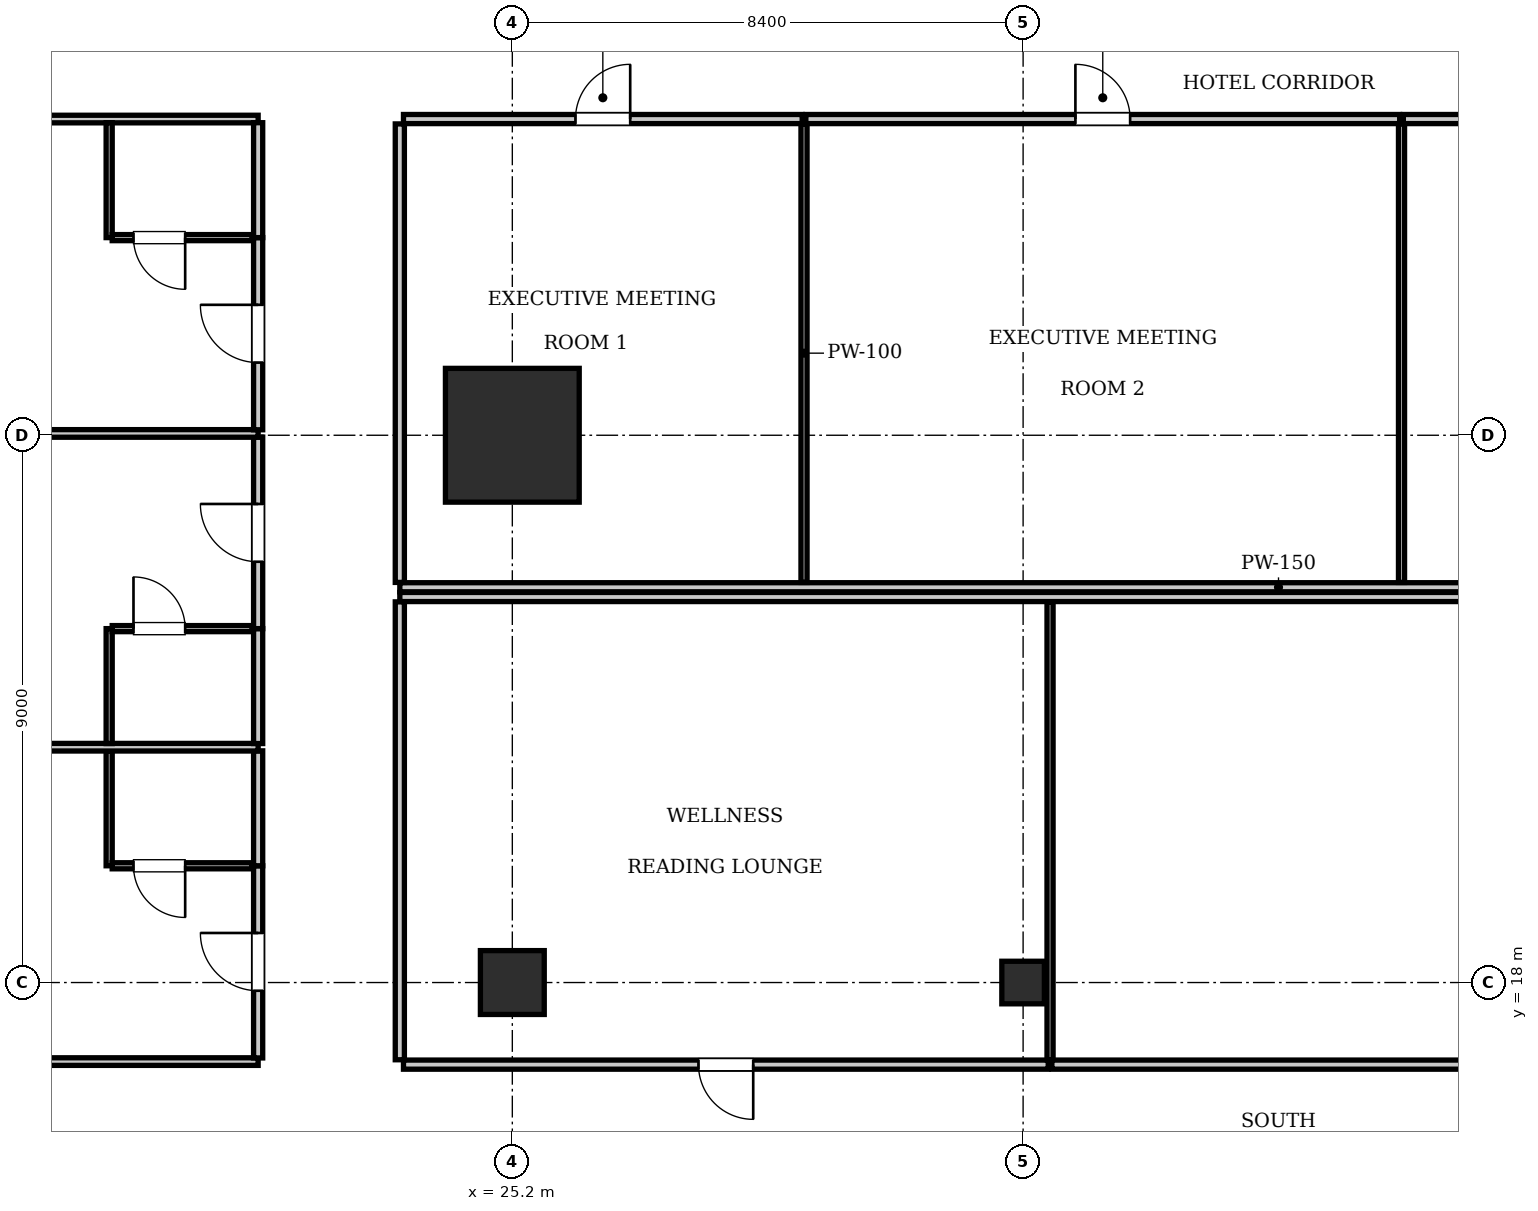
"""IFC4 building model, lengths in metres.
Left out: names, types, materials, properties, quantities, classifications, styles, units other than length and angle.
Written with IfcOpenShell. Run it as: python <this file> out.ifc"""

import sys

from ifc_helpers import new_model, si_unit, direction, frame, frame_2d, origin, origin_2d, place, context, subcontext, project, spatial, rectangle, i_section, extrude, element, fill, save


model = new_model("IFC4")
c1 = context("Model", 3, precision=1e-05, world=origin(), true_north=direction((0.0, 1.0)))
c2 = subcontext(c1, "Body", "Model", "MODEL_VIEW")
j1 = project(units=[si_unit("LENGTHUNIT", "METRE"), si_unit("PLANEANGLEUNIT", "RADIAN")], contexts=[c1])
p1 = place(None, origin())
s1 = spatial("IfcSite", under=j1, at=p1, CompositionType="ELEMENT")
p2 = place(p1, origin())
s2 = spatial("IfcBuilding", under=s1, at=p2, CompositionType="ELEMENT")
p3 = place(p2, frame((0.0, 0.0, 50.05)))
s3 = spatial("IfcBuildingStorey", under=s2, at=p3, CompositionType="ELEMENT", Elevation=50.05)
p4 = place(p3, frame((25.2, 27.0, 0.0), z_axis=(0.0, 0.0, 1.0), x_axis=(1.0, 0.0, 0.0)))
e1 = element("IfcColumn", 1, at=p4, inside=s3, PredefinedType="COLUMN", context=c2, shape_type="SweptSolid", body=[
    extrude(rectangle(XDim=2.2, YDim=2.2, at=origin_2d()), origin(), (0.0, 0.0, 1.0), 3.85),
])
p5 = place(p3, frame((25.2, 18.0, 0.0), z_axis=(0.0, 0.0, 1.0), x_axis=(1.0, 0.0, 0.0)))
e2 = element("IfcColumn", 2, at=p5, inside=s3, PredefinedType="COLUMN", context=c2, shape_type="SweptSolid", body=[
    extrude(rectangle(XDim=1.05, YDim=1.05, at=origin_2d()), origin(), (0.0, 0.0, 1.0), 3.85),
])
p6 = place(p3, frame((33.6, 18.0, 0.0), z_axis=(0.0, 0.0, 1.0), x_axis=(1.0, 0.0, 0.0)))
e3 = element("IfcColumn", 3, at=p6, inside=s3, PredefinedType="COLUMN", context=c2, shape_type="SweptSolid", body=[
    extrude(i_section(OverallWidth=0.7, OverallDepth=0.7, WebThickness=0.028, FlangeThickness=0.044, at=origin_2d()), origin(), (0.0, 0.0, 1.0), 3.85),
])
p7 = place(p3, frame((23.35, 24.5, 0.0), z_axis=(0.0, 0.0, 1.0), x_axis=(1.0, 0.0, 0.0)))
e4 = element("IfcWall", 4, at=p7, inside=s3, PredefinedType="PARTITIONING", context=c2, shape_type="SweptSolid", body=[
    extrude(rectangle(XDim=28.9, YDim=0.15, at=frame_2d((14.45, 0.0))), origin(), (0.0, 0.0, 1.0), 3.61),
])
p8 = place(p3, frame((23.35, 24.58, 0.0), z_axis=(0.0, 0.0, 1.0), x_axis=(0.0, 1.0, 0.0)))
e5 = element("IfcWall", 5, at=p8, inside=s3, PredefinedType="PARTITIONING", context=c2, shape_type="SweptSolid", body=[
    extrude(rectangle(XDim=7.54, YDim=0.15, at=frame_2d((3.77, 0.0))), origin(), (0.0, 0.0, 1.0), 3.61),
])
p9 = place(p3, frame((23.41, 32.2, 0.0), z_axis=(0.0, 0.0, 1.0), x_axis=(1.0, 0.0, 0.0)))
e6 = element("IfcWall", 6, at=p9, inside=s3, PredefinedType="PARTITIONING", context=c2, shape_type="SweptSolid", body=[
    extrude(rectangle(XDim=6.557, YDim=0.15, at=frame_2d((3.279, 0.0))), origin(), (0.0, 0.0, 1.0), 3.61),
])
p10 = place(p9, frame((2.829, 0.0, 0.0)))
e7 = element("IfcOpeningElement", 7, at=p10, cuts=e6, PredefinedType="OPENING", context=c2, shape_type="SweptSolid", body=[
    extrude(rectangle(XDim=0.9, YDim=2.1, at=frame_2d((0.45, 1.05))), frame((0.0, 0.085, 0.0), z_axis=(0.0, -1.0, 0.0), x_axis=(1.0, 0.0, 0.0)), (0.0, 0.0, 1.0), 0.17),
])
p11 = place(p3, frame((29.997, 24.58, 0.0), z_axis=(0.0, 0.0, 1.0), x_axis=(0.0, 1.0, 0.0)))
e8 = element("IfcWall", 8, at=p11, inside=s3, PredefinedType="PARTITIONING", context=c2, shape_type="SweptSolid", body=[
    extrude(rectangle(XDim=7.54, YDim=0.1, at=frame_2d((3.77, 0.0))), origin(), (0.0, 0.0, 1.0), 3.61),
])
p12 = place(p3, frame((30.027, 32.2, 0.0), z_axis=(0.0, 0.0, 1.0), x_axis=(1.0, 0.0, 0.0)))
e9 = element("IfcWall", 9, at=p12, inside=s3, PredefinedType="PARTITIONING", context=c2, shape_type="SweptSolid", body=[
    extrude(rectangle(XDim=9.766, YDim=0.15, at=frame_2d((4.883, 0.0))), origin(), (0.0, 0.0, 1.0), 3.61),
])
p13 = place(p12, frame((4.433, 0.0, 0.0)))
e10 = element("IfcOpeningElement", 10, at=p13, cuts=e9, PredefinedType="OPENING", context=c2, shape_type="SweptSolid", body=[
    extrude(rectangle(XDim=0.9, YDim=2.1, at=frame_2d((0.45, 1.05))), frame((0.0, 0.085, 0.0), z_axis=(0.0, -1.0, 0.0), x_axis=(1.0, 0.0, 0.0)), (0.0, 0.0, 1.0), 0.17),
])
p14 = place(p3, frame((39.823, 24.58, 0.0), z_axis=(0.0, 0.0, 1.0), x_axis=(0.0, 1.0, 0.0)))
e11 = element("IfcWall", 11, at=p14, inside=s3, PredefinedType="PARTITIONING", context=c2, shape_type="SweptSolid", body=[
    extrude(rectangle(XDim=7.54, YDim=0.1, at=frame_2d((3.77, 0.0))), origin(), (0.0, 0.0, 1.0), 3.61),
])
p15 = place(p3, frame((39.853, 32.2, 0.0), z_axis=(0.0, 0.0, 1.0), x_axis=(1.0, 0.0, 0.0)))
e12 = element("IfcWall", 12, at=p15, inside=s3, PredefinedType="PARTITIONING", context=c2, shape_type="SweptSolid", body=[
    extrude(rectangle(XDim=12.337, YDim=0.15, at=frame_2d((6.168, 0.0))), origin(), (0.0, 0.0, 1.0), 3.61),
])
p16 = place(p15, frame((5.719, 0.0, 0.0)))
e13 = element("IfcOpeningElement", 13, at=p16, cuts=e12, PredefinedType="OPENING", context=c2, shape_type="SweptSolid", body=[
    extrude(rectangle(XDim=0.9, YDim=2.1, at=frame_2d((0.45, 1.05))), frame((0.0, 0.085, 0.0), z_axis=(0.0, -1.0, 0.0), x_axis=(1.0, 0.0, 0.0)), (0.0, 0.0, 1.0), 0.17),
])
p17 = place(p3, frame((23.35, 24.34, 0.0), z_axis=(0.0, 0.0, 1.0), x_axis=(1.0, 0.0, 0.0)))
e14 = element("IfcWall", 14, at=p17, inside=s3, PredefinedType="PARTITIONING", context=c2, shape_type="SweptSolid", body=[
    extrude(rectangle(XDim=28.9, YDim=0.15, at=frame_2d((14.45, 0.0))), origin(), (0.0, 0.0, 1.0), 3.61),
])
p18 = place(p3, frame((23.35, 16.73, 0.0), z_axis=(0.0, 0.0, 1.0), x_axis=(0.0, 1.0, 0.0)))
e15 = element("IfcWall", 15, at=p18, inside=s3, PredefinedType="PARTITIONING", context=c2, shape_type="SweptSolid", body=[
    extrude(rectangle(XDim=7.53, YDim=0.15, at=frame_2d((3.765, 0.0))), origin(), (0.0, 0.0, 1.0), 3.61),
])
p19 = place(p3, frame((23.41, 16.65, 0.0), z_axis=(0.0, 0.0, 1.0), x_axis=(1.0, 0.0, 0.0)))
e16 = element("IfcWall", 16, at=p19, inside=s3, PredefinedType="PARTITIONING", context=c2, shape_type="SweptSolid", body=[
    extrude(rectangle(XDim=10.603, YDim=0.15, at=frame_2d((5.302, 0.0))), origin(), (0.0, 0.0, 1.0), 3.61),
])
p20 = place(p19, frame((4.852, 0.0, 0.0)))
e17 = element("IfcOpeningElement", 17, at=p20, cuts=e16, PredefinedType="OPENING", context=c2, shape_type="SweptSolid", body=[
    extrude(rectangle(XDim=0.9, YDim=2.1, at=frame_2d((0.45, 1.05))), frame((0.0, 0.085, 0.0), z_axis=(0.0, -1.0, 0.0), x_axis=(1.0, 0.0, 0.0)), (0.0, 0.0, 1.0), 0.17),
])
p21 = place(p3, frame((34.043, 16.73, 0.0), z_axis=(0.0, 0.0, 1.0), x_axis=(0.0, 1.0, 0.0)))
e18 = element("IfcWall", 18, at=p21, inside=s3, PredefinedType="PARTITIONING", context=c2, shape_type="SweptSolid", body=[
    extrude(rectangle(XDim=7.53, YDim=0.1, at=frame_2d((3.765, 0.0))), origin(), (0.0, 0.0, 1.0), 3.61),
])
p22 = place(p3, frame((34.073, 16.65, 0.0), z_axis=(0.0, 0.0, 1.0), x_axis=(1.0, 0.0, 0.0)))
e19 = element("IfcWall", 19, at=p22, inside=s3, PredefinedType="PARTITIONING", context=c2, shape_type="SweptSolid", body=[
    extrude(rectangle(XDim=18.117, YDim=0.15, at=frame_2d((9.059, 0.0))), origin(), (0.0, 0.0, 1.0), 3.61),
])
p23 = place(p22, frame((8.729, 0.0, 0.0)))
e20 = element("IfcOpeningElement", 20, at=p23, cuts=e19, PredefinedType="OPENING", context=c2, shape_type="SweptSolid", body=[
    extrude(rectangle(XDim=0.9, YDim=2.1, at=frame_2d((0.45, 1.05))), frame((0.0, 0.085, 0.0), z_axis=(0.0, -1.0, 0.0), x_axis=(1.0, 0.0, 0.0)), (0.0, 0.0, 1.0), 0.17),
])
for number, where, z_axis, x_axis in (
    (21, (10.9, 16.7, 0.0), (0.0, 0.0, 1.0), (1.0, 0.0, 0.0)),
    (22, (10.9, 32.2, 0.0), (0.0, 0.0, 1.0), (1.0, 0.0, 0.0)),
):
    element("IfcWall", number, at=place(p3, frame(where, z_axis=z_axis, x_axis=x_axis)), inside=s3, PredefinedType="PARTITIONING", context=c2, shape_type="SweptSolid", body=[
        extrude(rectangle(XDim=10.12, YDim=0.125, at=frame_2d((5.06, 0.0))), origin(), (0.0, 0.0, 1.0), 3.61),
    ])
p24 = place(p3, frame((21.02, 16.76, 0.0), z_axis=(0.0, 0.0, 1.0), x_axis=(0.0, 1.0, 0.0)))
e23 = element("IfcWall", 23, at=p24, inside=s3, PredefinedType="PARTITIONING", context=c2, shape_type="SweptSolid", body=[
    extrude(rectangle(XDim=3.16, YDim=0.15, at=frame_2d((1.58, 0.0))), origin(), (0.0, 0.0, 1.0), 3.403),
])
p25 = place(p24, frame((1.105, 0.0, 0.0)))
e24 = element("IfcOpeningElement", 24, at=p25, cuts=e23, PredefinedType="OPENING", context=c2, shape_type="SweptSolid", body=[
    extrude(rectangle(XDim=0.95, YDim=2.15, at=frame_2d((0.475, 1.075))), frame((0.0, 0.085, 0.0), z_axis=(0.0, -1.0, 0.0), x_axis=(1.0, 0.0, 0.0)), (0.0, 0.0, 1.0), 0.17),
])
p26 = place(p3, frame((21.02, 19.92, 0.0), z_axis=(0.0, 0.0, 1.0), x_axis=(0.0, 1.0, 0.0)))
e25 = element("IfcWall", 25, at=p26, inside=s3, PredefinedType="PARTITIONING", context=c2, shape_type="SweptSolid", body=[
    extrude(rectangle(XDim=1.89, YDim=0.15, at=frame_2d((0.945, 0.0))), origin(), (0.0, 0.0, 1.0), 3.457),
])
p27 = place(p3, frame((18.57, 19.92, 0.0), z_axis=(0.0, 0.0, 1.0), x_axis=(0.0, 1.0, 0.0)))
e26 = element("IfcWall", 26, at=p27, inside=s3, PredefinedType="PARTITIONING", context=c2, shape_type="SweptSolid", body=[
    extrude(rectangle(XDim=1.89, YDim=0.1, at=frame_2d((0.945, 0.0))), origin(), (0.0, 0.0, 1.0), 3.61),
])
p28 = place(p3, frame((18.62, 19.92, 0.0), z_axis=(0.0, 0.0, 1.0), x_axis=(1.0, 0.0, 0.0)))
e27 = element("IfcWall", 27, at=p28, inside=s3, PredefinedType="PARTITIONING", context=c2, shape_type="SweptSolid", body=[
    extrude(rectangle(XDim=2.3, YDim=0.1, at=frame_2d((1.15, 0.0))), origin(), (0.0, 0.0, 1.0), 3.61),
])
p29 = place(p28, frame((0.35, 0.0, 0.0)))
e28 = element("IfcOpeningElement", 28, at=p29, cuts=e27, PredefinedType="OPENING", context=c2, shape_type="SweptSolid", body=[
    extrude(rectangle(XDim=0.85, YDim=2.1, at=frame_2d((0.425, 1.05))), frame((0.0, 0.06, 0.0), z_axis=(0.0, -1.0, 0.0), x_axis=(1.0, 0.0, 0.0)), (0.0, 0.0, 1.0), 0.12),
])
p30 = place(p3, frame((10.9, 21.87, 0.0), z_axis=(0.0, 0.0, 1.0), x_axis=(1.0, 0.0, 0.0)))
e29 = element("IfcWall", 29, at=p30, inside=s3, PredefinedType="PARTITIONING", context=c2, shape_type="SweptSolid", body=[
    extrude(rectangle(XDim=10.12, YDim=0.125, at=frame_2d((5.06, 0.0))), origin(), (0.0, 0.0, 1.0), 3.61),
])
p31 = place(p3, frame((21.02, 21.93, 0.0), z_axis=(0.0, 0.0, 1.0), x_axis=(0.0, 1.0, 0.0)))
e30 = element("IfcWall", 30, at=p31, inside=s3, PredefinedType="PARTITIONING", context=c2, shape_type="SweptSolid", body=[
    extrude(rectangle(XDim=1.89, YDim=0.15, at=frame_2d((0.945, 0.0))), origin(), (0.0, 0.0, 1.0), 3.457),
])
p32 = place(p3, frame((21.02, 23.82, 0.0), z_axis=(0.0, 0.0, 1.0), x_axis=(0.0, 1.0, 0.0)))
e31 = element("IfcWall", 31, at=p32, inside=s3, PredefinedType="PARTITIONING", context=c2, shape_type="SweptSolid", body=[
    extrude(rectangle(XDim=3.15, YDim=0.15, at=frame_2d((1.575, 0.0))), origin(), (0.0, 0.0, 1.0), 3.457),
])
p33 = place(p32, frame((1.1, 0.0, 0.0)))
e32 = element("IfcOpeningElement", 32, at=p33, cuts=e31, PredefinedType="OPENING", context=c2, shape_type="SweptSolid", body=[
    extrude(rectangle(XDim=0.95, YDim=2.15, at=frame_2d((0.475, 1.075))), frame((0.0, 0.085, 0.0), z_axis=(0.0, -1.0, 0.0), x_axis=(1.0, 0.0, 0.0)), (0.0, 0.0, 1.0), 0.17),
])
p34 = place(p3, frame((18.57, 21.93, 0.0), z_axis=(0.0, 0.0, 1.0), x_axis=(0.0, 1.0, 0.0)))
e33 = element("IfcWall", 33, at=p34, inside=s3, PredefinedType="PARTITIONING", context=c2, shape_type="SweptSolid", body=[
    extrude(rectangle(XDim=1.89, YDim=0.1, at=frame_2d((0.945, 0.0))), origin(), (0.0, 0.0, 1.0), 3.61),
])
p35 = place(p3, frame((18.62, 23.82, 0.0), z_axis=(0.0, 0.0, 1.0), x_axis=(1.0, 0.0, 0.0)))
e34 = element("IfcWall", 34, at=p35, inside=s3, PredefinedType="PARTITIONING", context=c2, shape_type="SweptSolid", body=[
    extrude(rectangle(XDim=2.3, YDim=0.1, at=frame_2d((1.15, 0.0))), origin(), (0.0, 0.0, 1.0), 3.61),
])
p36 = place(p35, frame((0.35, 0.0, 0.0)))
e35 = element("IfcOpeningElement", 35, at=p36, cuts=e34, PredefinedType="OPENING", context=c2, shape_type="SweptSolid", body=[
    extrude(rectangle(XDim=0.85, YDim=2.1, at=frame_2d((0.425, 1.05))), frame((0.0, 0.06, 0.0), z_axis=(0.0, -1.0, 0.0), x_axis=(1.0, 0.0, 0.0)), (0.0, 0.0, 1.0), 0.12),
])
p37 = place(p3, frame((10.9, 27.03, 0.0), z_axis=(0.0, 0.0, 1.0), x_axis=(1.0, 0.0, 0.0)))
e36 = element("IfcWall", 36, at=p37, inside=s3, PredefinedType="PARTITIONING", context=c2, shape_type="SweptSolid", body=[
    extrude(rectangle(XDim=10.12, YDim=0.125, at=frame_2d((5.06, 0.0))), origin(), (0.0, 0.0, 1.0), 2.988),
])
p38 = place(p3, frame((21.02, 27.09, 0.0), z_axis=(0.0, 0.0, 1.0), x_axis=(0.0, 1.0, 0.0)))
e37 = element("IfcWall", 37, at=p38, inside=s3, PredefinedType="PARTITIONING", context=c2, shape_type="SweptSolid", body=[
    extrude(rectangle(XDim=3.16, YDim=0.15, at=frame_2d((1.58, 0.0))), origin(), (0.0, 0.0, 1.0), 3.207),
])
p39 = place(p38, frame((1.105, 0.0, 0.0)))
e38 = element("IfcOpeningElement", 38, at=p39, cuts=e37, PredefinedType="OPENING", context=c2, shape_type="SweptSolid", body=[
    extrude(rectangle(XDim=0.95, YDim=2.15, at=frame_2d((0.475, 1.075))), frame((0.0, 0.085, 0.0), z_axis=(0.0, -1.0, 0.0), x_axis=(1.0, 0.0, 0.0)), (0.0, 0.0, 1.0), 0.17),
])
p40 = place(p3, frame((21.02, 30.25, 0.0), z_axis=(0.0, 0.0, 1.0), x_axis=(0.0, 1.0, 0.0)))
e39 = element("IfcWall", 39, at=p40, inside=s3, PredefinedType="PARTITIONING", context=c2, shape_type="SweptSolid", body=[
    extrude(rectangle(XDim=1.89, YDim=0.15, at=frame_2d((0.945, 0.0))), origin(), (0.0, 0.0, 1.0), 3.207),
])
p41 = place(p3, frame((18.57, 30.25, 0.0), z_axis=(0.0, 0.0, 1.0), x_axis=(0.0, 1.0, 0.0)))
e40 = element("IfcWall", 40, at=p41, inside=s3, PredefinedType="PARTITIONING", context=c2, shape_type="SweptSolid", body=[
    extrude(rectangle(XDim=1.89, YDim=0.1, at=frame_2d((0.945, 0.0))), origin(), (0.0, 0.0, 1.0), 3.61),
])
p42 = place(p3, frame((18.62, 30.25, 0.0), z_axis=(0.0, 0.0, 1.0), x_axis=(1.0, 0.0, 0.0)))
e41 = element("IfcWall", 41, at=p42, inside=s3, PredefinedType="PARTITIONING", context=c2, shape_type="SweptSolid", body=[
    extrude(rectangle(XDim=2.3, YDim=0.1, at=frame_2d((1.15, 0.0))), origin(), (0.0, 0.0, 1.0), 3.61),
])
p43 = place(p42, frame((0.35, 0.0, 0.0)))
e42 = element("IfcOpeningElement", 42, at=p43, cuts=e41, PredefinedType="OPENING", context=c2, shape_type="SweptSolid", body=[
    extrude(rectangle(XDim=0.85, YDim=2.1, at=frame_2d((0.425, 1.05))), frame((0.0, 0.06, 0.0), z_axis=(0.0, -1.0, 0.0), x_axis=(1.0, 0.0, 0.0)), (0.0, 0.0, 1.0), 0.12),
])
p44 = place(p10, origin())
e43 = element("IfcDoor", 43, at=p44, inside=s3, OperationType="SINGLE_SWING_RIGHT", PredefinedType="DOOR", context=c2, shape_type="SweptSolid", body=[
    extrude(rectangle(XDim=0.9, YDim=2.1, at=frame_2d((0.45, 1.05))), frame((0.0, 0.025, 0.0), z_axis=(0.0, -1.0, 0.0), x_axis=(1.0, 0.0, 0.0)), (0.0, 0.0, 1.0), 0.05),
])
fill(e7, e43)
p45 = place(p13, origin())
e44 = element("IfcDoor", 44, at=p45, inside=s3, OperationType="SINGLE_SWING_LEFT", PredefinedType="DOOR", context=c2, shape_type="SweptSolid", body=[
    extrude(rectangle(XDim=0.9, YDim=2.1, at=frame_2d((0.45, 1.05))), frame((0.0, 0.025, 0.0), z_axis=(0.0, -1.0, 0.0), x_axis=(1.0, 0.0, 0.0)), (0.0, 0.0, 1.0), 0.05),
])
fill(e10, e44)
p46 = place(p20, frame((0.9, 0.0, 0.0), z_axis=(0.0, 0.0, 1.0), x_axis=(-1.0, 0.0, 0.0)))
e45 = element("IfcDoor", 45, at=p46, inside=s3, OperationType="SINGLE_SWING_LEFT", PredefinedType="DOOR", context=c2, shape_type="SweptSolid", body=[
    extrude(rectangle(XDim=0.9, YDim=2.1, at=frame_2d((0.45, 1.05))), frame((0.0, 0.025, 0.0), z_axis=(0.0, -1.0, 0.0), x_axis=(1.0, 0.0, 0.0)), (0.0, 0.0, 1.0), 0.05),
])
fill(e17, e45)
p47 = place(p29, frame((0.85, 0.0, 0.0), z_axis=(0.0, 0.0, 1.0), x_axis=(-1.0, 0.0, 0.0)))
e46 = element("IfcDoor", 46, at=p47, inside=s3, OperationType="SINGLE_SWING_LEFT", PredefinedType="DOOR", context=c2, shape_type="SweptSolid", body=[
    extrude(rectangle(XDim=0.85, YDim=2.1, at=frame_2d((0.425, 1.05))), frame((0.0, 0.025, 0.0), z_axis=(0.0, -1.0, 0.0), x_axis=(1.0, 0.0, 0.0)), (0.0, 0.0, 1.0), 0.05),
])
fill(e28, e46)
p48 = place(p25, origin())
e47 = element("IfcDoor", 47, at=p48, inside=s3, OperationType="SINGLE_SWING_RIGHT", PredefinedType="DOOR", context=c2, shape_type="SweptSolid", body=[
    extrude(rectangle(XDim=0.95, YDim=2.15, at=frame_2d((0.475, 1.075))), frame((0.0, 0.025, 0.0), z_axis=(0.0, -1.0, 0.0), x_axis=(1.0, 0.0, 0.0)), (0.0, 0.0, 1.0), 0.05),
])
fill(e24, e47)
p49 = place(p36, origin())
e48 = element("IfcDoor", 48, at=p49, inside=s3, OperationType="SINGLE_SWING_LEFT", PredefinedType="DOOR", context=c2, shape_type="SweptSolid", body=[
    extrude(rectangle(XDim=0.85, YDim=2.1, at=frame_2d((0.425, 1.05))), frame((0.0, 0.025, 0.0), z_axis=(0.0, -1.0, 0.0), x_axis=(1.0, 0.0, 0.0)), (0.0, 0.0, 1.0), 0.05),
])
fill(e35, e48)
p50 = place(p33, origin())
e49 = element("IfcDoor", 49, at=p50, inside=s3, OperationType="SINGLE_SWING_RIGHT", PredefinedType="DOOR", context=c2, shape_type="SweptSolid", body=[
    extrude(rectangle(XDim=0.95, YDim=2.15, at=frame_2d((0.475, 1.075))), frame((0.0, 0.025, 0.0), z_axis=(0.0, -1.0, 0.0), x_axis=(1.0, 0.0, 0.0)), (0.0, 0.0, 1.0), 0.05),
])
fill(e32, e49)
p51 = place(p43, frame((0.85, 0.0, 0.0), z_axis=(0.0, 0.0, 1.0), x_axis=(-1.0, 0.0, 0.0)))
e50 = element("IfcDoor", 50, at=p51, inside=s3, OperationType="SINGLE_SWING_LEFT", PredefinedType="DOOR", context=c2, shape_type="SweptSolid", body=[
    extrude(rectangle(XDim=0.85, YDim=2.1, at=frame_2d((0.425, 1.05))), frame((0.0, 0.025, 0.0), z_axis=(0.0, -1.0, 0.0), x_axis=(1.0, 0.0, 0.0)), (0.0, 0.0, 1.0), 0.05),
])
fill(e42, e50)
p52 = place(p39, origin())
e51 = element("IfcDoor", 51, at=p52, inside=s3, OperationType="SINGLE_SWING_RIGHT", PredefinedType="DOOR", context=c2, shape_type="SweptSolid", body=[
    extrude(rectangle(XDim=0.95, YDim=2.15, at=frame_2d((0.475, 1.075))), frame((0.0, 0.025, 0.0), z_axis=(0.0, -1.0, 0.0), x_axis=(1.0, 0.0, 0.0)), (0.0, 0.0, 1.0), 0.05),
])
fill(e38, e51)
save(model, sys.argv[1])
